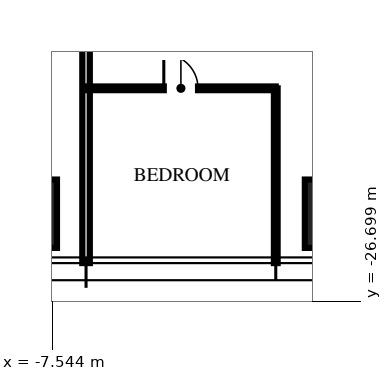
"""IFC4 building model, lengths in metres.
Left out: names, types, materials, properties, quantities, classifications, styles, units other than length and angle.
Written with IfcOpenShell. Run it as: python <this file> out.ifc"""

import sys

from ifc_helpers import new_model, si_unit, direction, frame, frame_2d, origin, origin_2d, place, context, subcontext, project, spatial, rectangle, extrude, element, fill, save


model = new_model("IFC4")
c1 = context("Model", 3, precision=1e-05, world=origin(), true_north=direction((0.0, 1.0)))
c2 = subcontext(c1, "Body", "Model", "MODEL_VIEW")
j1 = project(units=[si_unit("LENGTHUNIT", "METRE"), si_unit("PLANEANGLEUNIT", "RADIAN")], contexts=[c1])
p1 = place(None, origin())
s1 = spatial("IfcSite", under=j1, at=p1, CompositionType="ELEMENT")
p2 = place(p1, origin())
s2 = spatial("IfcBuilding", under=s1, at=p2, CompositionType="ELEMENT")
p3 = place(p2, frame((0.0, 0.0, 259.5)))
s3 = spatial("IfcBuildingStorey", under=s2, at=p3, CompositionType="ELEMENT", Elevation=259.5)
for number, where, z_axis, x_axis in (
    (1, (0.0, -24.4, 0.0), (0.0, 0.0, 1.0), (1.0, 0.0, 0.0)),
    (2, (-8.32, -24.4, 0.0), (0.0, 0.0, 1.0), (1.0, 0.0, 0.0)),
):
    element("IfcColumn", number, at=place(p3, frame(where, z_axis=z_axis, x_axis=x_axis)), inside=s3, PredefinedType="COLUMN", context=c2, shape_type="SweptSolid", body=[
        extrude(rectangle(XDim=1.8, YDim=1.8, at=origin_2d()), origin(), (0.0, 0.0, 1.0), 3.75),
    ])
p4 = place(p3, frame((-6.656, -12.8, 0.0), z_axis=(0.0, 0.0, 1.0), x_axis=(0.0, -1.0, 0.0)))
e3 = element("IfcWall", 3, at=p4, inside=s3, PredefinedType="PARTITIONING", context=c2, shape_type="SweptSolid", body=[
    extrude(rectangle(XDim=12.9, YDim=0.2, at=frame_2d((6.45, 0.0))), origin(), (0.0, 0.0, 1.0), 2.91),
])
p5 = place(p3, frame((-1.664, -21.1, 0.0), z_axis=(0.0, 0.0, 1.0), x_axis=(0.0, -1.0, 0.0)))
e4 = element("IfcWall", 4, at=p5, inside=s3, PredefinedType="PARTITIONING", context=c2, shape_type="SweptSolid", body=[
    extrude(rectangle(XDim=4.6, YDim=0.1, at=frame_2d((2.3, 0.0))), origin(), (0.0, 0.0, 1.0), 2.91),
])
p6 = place(p3, frame((-6.656, -21.1, 0.0), z_axis=(0.0, 0.0, 1.0), x_axis=(1.0, 0.0, 0.0)))
e5 = element("IfcWall", 5, at=p6, inside=s3, PredefinedType="PARTITIONING", context=c2, shape_type="SweptSolid", body=[
    extrude(rectangle(XDim=4.992, YDim=0.1, at=frame_2d((2.496, 0.0))), origin(), (0.0, 0.0, 1.0), 2.81),
])
p7 = place(p6, frame((2.046, 0.0, 0.0)))
e6 = element("IfcOpeningElement", 6, at=p7, cuts=e5, PredefinedType="OPENING", context=c2, shape_type="SweptSolid", body=[
    extrude(rectangle(XDim=0.9, YDim=2.1, at=frame_2d((0.45, 1.05))), frame((0.0, 0.06, 0.0), z_axis=(0.0, -1.0, 0.0), x_axis=(1.0, 0.0, 0.0)), (0.0, 0.0, 1.0), 0.12),
])
p8 = place(p7, origin())
e7 = element("IfcDoor", 7, at=p8, inside=s3, OperationType="SINGLE_SWING_LEFT", PredefinedType="DOOR", context=c2, shape_type="SweptSolid", body=[
    extrude(rectangle(XDim=0.9, YDim=2.1, at=frame_2d((0.45, 1.05))), frame((0.0, 0.025, 0.0), z_axis=(0.0, -1.0, 0.0), x_axis=(1.0, 0.0, 0.0)), (0.0, 0.0, 1.0), 0.05),
])
fill(e6, e7)
save(model, sys.argv[1])
